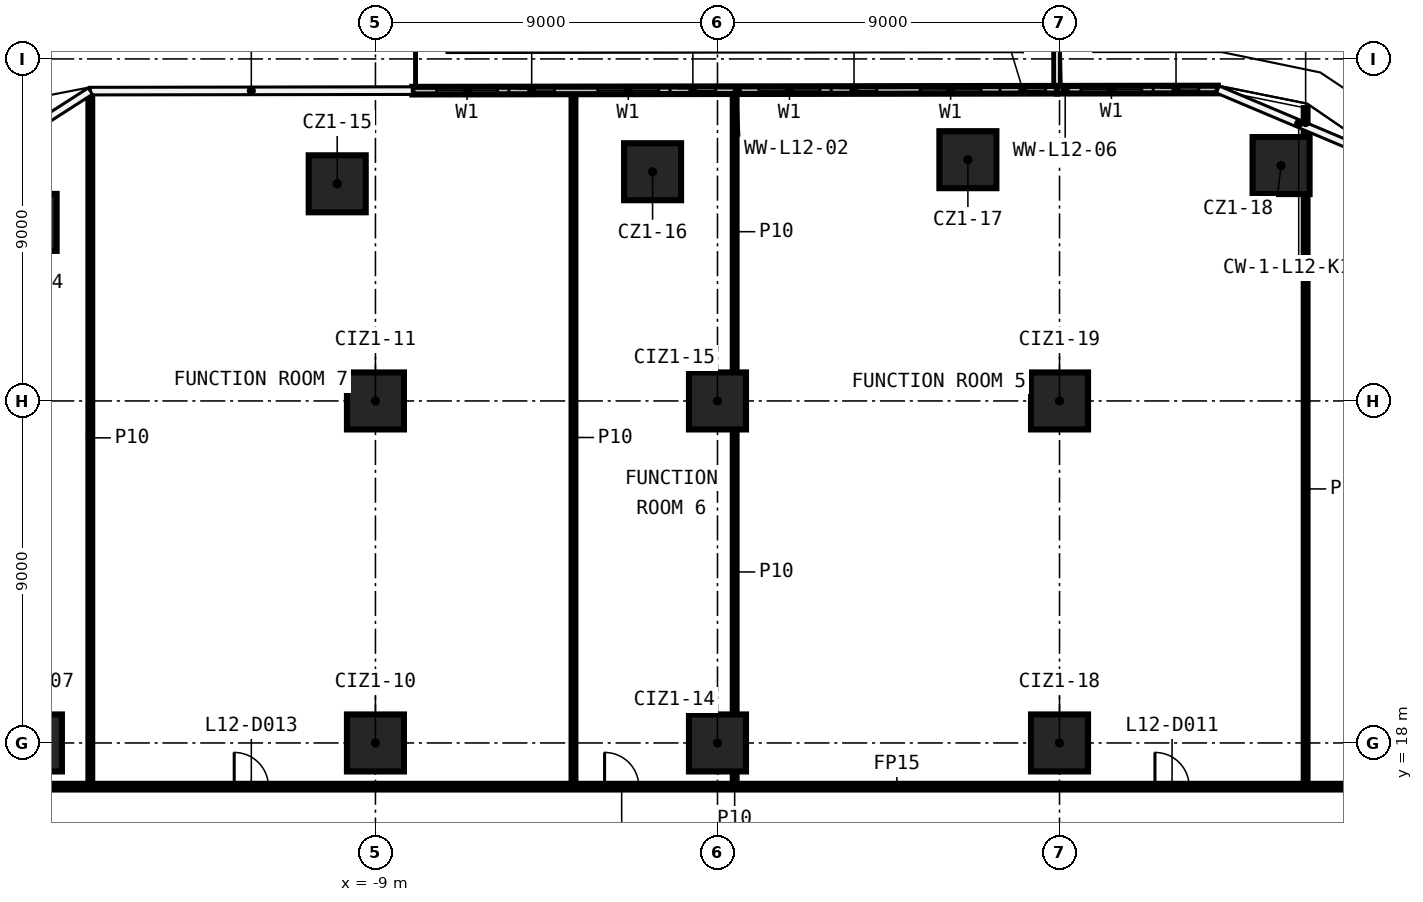
"""IFC4 building model, lengths in metres.
Left out: names, types, materials, properties, quantities, classifications, styles, units other than length and angle.
Written with IfcOpenShell. Run it as: python <this file> out.ifc"""

import sys

from ifc_helpers import new_model, si_unit, direction, frame, frame_2d, origin, origin_2d, place, context, subcontext, project, spatial, rectangle, extrude, element, fill, save


model = new_model("IFC4")
c1 = context("Model", 3, precision=1e-05, world=origin(), true_north=direction((0.0, 1.0)))
c2 = subcontext(c1, "Body", "Model", "MODEL_VIEW")
j1 = project(units=[si_unit("LENGTHUNIT", "METRE"), si_unit("PLANEANGLEUNIT", "RADIAN")], contexts=[c1])
p1 = place(None, origin())
s1 = spatial("IfcSite", under=j1, at=p1, CompositionType="ELEMENT")
p2 = place(p1, origin())
s2 = spatial("IfcBuilding", under=s1, at=p2, CompositionType="ELEMENT")
p3 = place(p2, frame((0.0, 0.0, 66.2)))
s3 = spatial("IfcBuildingStorey", under=s2, at=p3, CompositionType="ELEMENT", Elevation=66.2)
for number, where, z_axis, x_axis in (
    (1, (-18.139, 31.699, 0.0), (0.0, 0.0, 1.0), (1.0, 0.0, 0.0)),
    (2, (-10.006, 32.714, 0.0), (0.0, 0.0, 1.0), (1.0, 0.0, 0.0)),
    (3, (-1.708, 33.032, 0.0), (0.0, 0.0, 1.0), (1.0, 0.0, 0.0)),
    (4, (6.589, 33.349, 0.0), (0.0, 0.0, 1.0), (1.0, 0.0, 0.0)),
    (5, (14.83, 33.194, 0.0), (0.0, 0.0, 1.0), (1.0, 0.0, 0.0)),
    (6, (-18.0, 18.0, 0.0), (0.0, 0.0, 1.0), (1.0, 0.0, 0.0)),
    (7, (-9.0, 18.0, 0.0), (0.0, 0.0, 1.0), (1.0, 0.0, 0.0)),
    (8, (-9.0, 27.0, 0.0), (0.0, 0.0, 1.0), (1.0, 0.0, 0.0)),
    (9, (0.0, 18.0, 0.0), (0.0, 0.0, 1.0), (1.0, 0.0, 0.0)),
    (10, (0.0, 27.0, 0.0), (0.0, 0.0, 1.0), (1.0, 0.0, 0.0)),
    (11, (9.0, 18.0, 0.0), (0.0, 0.0, 1.0), (1.0, 0.0, 0.0)),
    (12, (9.0, 27.0, 0.0), (0.0, 0.0, 1.0), (1.0, 0.0, 0.0)),
):
    element("IfcColumn", number, at=place(p3, frame(where, z_axis=z_axis, x_axis=x_axis)), inside=s3, PredefinedType="COLUMN", context=c2, shape_type="SweptSolid", body=[
        extrude(rectangle(XDim=1.5, YDim=1.5, at=origin_2d()), origin(), (0.0, 0.0, 1.0), 3.3),
    ])
p4 = place(p3, frame((-19.925, 16.85, 0.0), z_axis=(0.0, 0.0, 1.0), x_axis=(1.0, 0.0, 0.0)))
e13 = element("IfcWall", 13, at=p4, inside=s3, PredefinedType="PARTITIONING", context=c2, shape_type="SweptSolid", body=[
    extrude(rectangle(XDim=39.85, YDim=0.15, at=frame_2d((19.925, 0.0))), origin(), (0.0, 0.0, 1.0), 3.3),
])
p5 = place(p4, frame((31.436, 0.0, 0.0)))
e14 = element("IfcOpeningElement", 14, at=p5, cuts=e13, PredefinedType="OPENING", context=c2, shape_type="SweptSolid", body=[
    extrude(rectangle(XDim=0.9, YDim=2.1, at=frame_2d((0.45, 1.05))), frame((0.0, 0.085, 0.0), z_axis=(0.0, -1.0, 0.0), x_axis=(1.0, 0.0, 0.0)), (0.0, 0.0, 1.0), 0.17),
])
p6 = place(p4, frame((16.954, 0.0, 0.0)))
e15 = element("IfcOpeningElement", 15, at=p6, cuts=e13, PredefinedType="OPENING", context=c2, shape_type="SweptSolid", body=[
    extrude(rectangle(XDim=0.9, YDim=2.1, at=frame_2d((0.45, 1.05))), frame((0.0, 0.085, 0.0), z_axis=(0.0, -1.0, 0.0), x_axis=(1.0, 0.0, 0.0)), (0.0, 0.0, 1.0), 0.17),
])
p7 = place(p4, frame((7.208, 0.0, 0.0)))
e16 = element("IfcOpeningElement", 16, at=p7, cuts=e13, PredefinedType="OPENING", context=c2, shape_type="SweptSolid", body=[
    extrude(rectangle(XDim=0.9, YDim=2.1, at=frame_2d((0.45, 1.05))), frame((0.0, 0.085, 0.0), z_axis=(0.0, -1.0, 0.0), x_axis=(1.0, 0.0, 0.0)), (0.0, 0.0, 1.0), 0.17),
])
p8 = place(p3, frame((15.476, 16.925, 0.0), z_axis=(0.0, 0.0, 1.0), x_axis=(0.0, 1.0, 0.0)))
e17 = element("IfcWall", 17, at=p8, inside=s3, PredefinedType="PARTITIONING", context=c2, shape_type="SweptSolid", body=[
    extrude(rectangle(XDim=15.519, YDim=0.1, at=frame_2d((7.76, 0.0))), origin(), (0.0, 0.0, 1.0), 3.3),
])
p9 = place(p3, frame((15.476, 33.944, 0.0), z_axis=(0.0, 0.0, 1.0), x_axis=(0.0, 1.0, 0.0)))
e18 = element("IfcWall", 18, at=p9, inside=s3, PredefinedType="PARTITIONING", context=c2, shape_type="SweptSolid", body=[
    extrude(rectangle(XDim=0.762, YDim=0.1, at=frame_2d((0.381, 0.0))), origin(), (0.0, 0.0, 1.0), 3.3),
])
p10 = place(p3, frame((0.452, 16.925, 0.0), z_axis=(0.0, 0.0, 1.0), x_axis=(0.0, 1.0, 0.0)))
e19 = element("IfcWall", 19, at=p10, inside=s3, PredefinedType="PARTITIONING", context=c2, shape_type="SweptSolid", body=[
    extrude(rectangle(XDim=0.325, YDim=0.1, at=frame_2d((0.163, 0.0))), origin(), (0.0, 0.0, 1.0), 3.3),
])
p11 = place(p3, frame((0.452, 18.75, 0.0), z_axis=(0.0, 0.0, 1.0), x_axis=(0.0, 1.0, 0.0)))
e20 = element("IfcWall", 20, at=p11, inside=s3, PredefinedType="PARTITIONING", context=c2, shape_type="SweptSolid", body=[
    extrude(rectangle(XDim=7.5, YDim=0.1, at=frame_2d((3.75, 0.0))), origin(), (0.0, 0.0, 1.0), 3.3),
])
p12 = place(p3, frame((0.452, 27.75, 0.0), z_axis=(0.0, 0.0, 1.0), x_axis=(0.0, 1.0, 0.0)))
e21 = element("IfcWall", 21, at=p12, inside=s3, PredefinedType="PARTITIONING", context=c2, shape_type="SweptSolid", body=[
    extrude(rectangle(XDim=7.407, YDim=0.1, at=frame_2d((3.704, 0.0))), origin(), (0.0, 0.0, 1.0), 3.3),
])
p13 = place(p3, frame((-3.789, 16.925, 0.0), z_axis=(0.0, 0.0, 1.0), x_axis=(0.0, 1.0, 0.0)))
e22 = element("IfcWall", 22, at=p13, inside=s3, PredefinedType="PARTITIONING", context=c2, shape_type="SweptSolid", body=[
    extrude(rectangle(XDim=18.226, YDim=0.1, at=frame_2d((9.113, 0.0))), origin(), (0.0, 0.0, 1.0), 3.3),
])
p14 = place(p3, frame((-16.503, 16.925, 0.0), z_axis=(0.0, 0.0, 1.0), x_axis=(0.0, 1.0, 0.0)))
e23 = element("IfcWall", 23, at=p14, inside=s3, PredefinedType="PARTITIONING", context=c2, shape_type="SweptSolid", body=[
    extrude(rectangle(XDim=18.208, YDim=0.1, at=frame_2d((9.104, 0.0))), origin(), (0.0, 0.0, 1.0), 3.3),
])
p15 = place(p3, frame((8.934, 35.19, 0.0), z_axis=(0.0, 0.0, 1.0), x_axis=(-0.999998964441, -0.001439137329, 0.0)))
e24 = element("IfcWall", 24, at=p15, inside=s3, PredefinedType="SOLIDWALL", context=c2, shape_type="SweptSolid", body=[
    extrude(rectangle(XDim=16.964, YDim=0.2, at=frame_2d((8.482, 0.0))), origin(), (0.0, 0.0, 1.0), 3.3),
])
p16 = place(p15, frame((2.0, 0.0, 0.6)))
e25 = element("IfcOpeningElement", 25, at=p16, cuts=e24, PredefinedType="OPENING", context=c2, shape_type="SweptSolid", body=[
    extrude(rectangle(XDim=1.6, YDim=2.4, at=frame_2d((0.8, 1.2))), frame((0.0, 0.11, 0.0), z_axis=(0.0, -1.0, 0.0), x_axis=(1.0, 0.0, 0.0)), (0.0, 0.0, 1.0), 0.22),
])
p17 = place(p15, frame((0.3, 0.0, 0.0)))
e26 = element("IfcOpeningElement", 26, at=p17, cuts=e24, PredefinedType="OPENING", context=c2, shape_type="SweptSolid", body=[
    extrude(rectangle(XDim=1.2, YDim=2.4, at=frame_2d((0.6, 1.2))), frame((0.0, 0.11, 0.0), z_axis=(0.0, -1.0, 0.0), x_axis=(1.0, 0.0, 0.0)), (0.0, 0.0, 1.0), 0.22),
])
p18 = place(p15, frame((6.241, 0.0, 0.6)))
e27 = element("IfcOpeningElement", 27, at=p18, cuts=e24, PredefinedType="OPENING", context=c2, shape_type="SweptSolid", body=[
    extrude(rectangle(XDim=1.6, YDim=2.4, at=frame_2d((0.8, 1.2))), frame((0.0, 0.11, 0.0), z_axis=(0.0, -1.0, 0.0), x_axis=(1.0, 0.0, 0.0)), (0.0, 0.0, 1.0), 0.22),
])
p19 = place(p15, frame((4.741, 0.0, 0.0)))
e28 = element("IfcOpeningElement", 28, at=p19, cuts=e24, PredefinedType="OPENING", context=c2, shape_type="SweptSolid", body=[
    extrude(rectangle(XDim=1.2, YDim=2.4, at=frame_2d((0.6, 1.2))), frame((0.0, 0.11, 0.0), z_axis=(0.0, -1.0, 0.0), x_axis=(1.0, 0.0, 0.0)), (0.0, 0.0, 1.0), 0.22),
])
p20 = place(p15, frame((10.482, 0.0, 0.6)))
e29 = element("IfcOpeningElement", 29, at=p20, cuts=e24, PredefinedType="OPENING", context=c2, shape_type="SweptSolid", body=[
    extrude(rectangle(XDim=1.6, YDim=2.4, at=frame_2d((0.8, 1.2))), frame((0.0, 0.11, 0.0), z_axis=(0.0, -1.0, 0.0), x_axis=(1.0, 0.0, 0.0)), (0.0, 0.0, 1.0), 0.22),
])
p21 = place(p15, frame((8.982, 0.0, 0.0)))
e30 = element("IfcOpeningElement", 30, at=p21, cuts=e24, PredefinedType="OPENING", context=c2, shape_type="SweptSolid", body=[
    extrude(rectangle(XDim=1.2, YDim=2.4, at=frame_2d((0.6, 1.2))), frame((0.0, 0.11, 0.0), z_axis=(0.0, -1.0, 0.0), x_axis=(1.0, 0.0, 0.0)), (0.0, 0.0, 1.0), 0.22),
])
p22 = place(p15, frame((14.723, 0.0, 0.6)))
e31 = element("IfcOpeningElement", 31, at=p22, cuts=e24, PredefinedType="OPENING", context=c2, shape_type="SweptSolid", body=[
    extrude(rectangle(XDim=1.6, YDim=2.4, at=frame_2d((0.8, 1.2))), frame((0.0, 0.11, 0.0), z_axis=(0.0, -1.0, 0.0), x_axis=(1.0, 0.0, 0.0)), (0.0, 0.0, 1.0), 0.22),
])
p23 = place(p15, frame((13.223, 0.0, 0.0)))
e32 = element("IfcOpeningElement", 32, at=p23, cuts=e24, PredefinedType="OPENING", context=c2, shape_type="SweptSolid", body=[
    extrude(rectangle(XDim=1.2, YDim=2.4, at=frame_2d((0.6, 1.2))), frame((0.0, 0.11, 0.0), z_axis=(0.0, -1.0, 0.0), x_axis=(1.0, 0.0, 0.0)), (0.0, 0.0, 1.0), 0.22),
])
p24 = place(p3, frame((13.166, 35.196, 0.0), z_axis=(0.0, 0.0, 1.0), x_axis=(-0.999998959596, -0.001442500374, 0.0)))
e33 = element("IfcWall", 33, at=p24, inside=s3, PredefinedType="SOLIDWALL", context=c2, shape_type="SweptSolid", body=[
    extrude(rectangle(XDim=4.231, YDim=0.2, at=frame_2d((2.116, 0.0))), origin(), (0.0, 0.0, 1.0), 3.3),
])
p25 = place(p24, frame((2.0, 0.0, 0.6)))
e34 = element("IfcOpeningElement", 34, at=p25, cuts=e33, PredefinedType="OPENING", context=c2, shape_type="SweptSolid", body=[
    extrude(rectangle(XDim=1.6, YDim=2.4, at=frame_2d((0.8, 1.2))), frame((0.0, 0.11, 0.0), z_axis=(0.0, -1.0, 0.0), x_axis=(1.0, 0.0, 0.0)), (0.0, 0.0, 1.0), 0.22),
])
p26 = place(p24, frame((0.5, 0.0, 0.0)))
e35 = element("IfcOpeningElement", 35, at=p26, cuts=e33, PredefinedType="OPENING", context=c2, shape_type="SweptSolid", body=[
    extrude(rectangle(XDim=1.2, YDim=2.4, at=frame_2d((0.6, 1.2))), frame((0.0, 0.11, 0.0), z_axis=(0.0, -1.0, 0.0), x_axis=(1.0, 0.0, 0.0)), (0.0, 0.0, 1.0), 0.22),
])
p27 = place(p5, origin())
e36 = element("IfcDoor", 36, at=p27, inside=s3, OperationType="SINGLE_SWING_RIGHT", PredefinedType="DOOR", context=c2, shape_type="SweptSolid", body=[
    extrude(rectangle(XDim=0.9, YDim=2.1, at=frame_2d((0.45, 1.05))), frame((0.0, 0.025, 0.0), z_axis=(0.0, -1.0, 0.0), x_axis=(1.0, 0.0, 0.0)), (0.0, 0.0, 1.0), 0.05),
])
fill(e14, e36)
p28 = place(p6, origin())
e37 = element("IfcDoor", 37, at=p28, inside=s3, OperationType="SINGLE_SWING_LEFT", PredefinedType="DOOR", context=c2, shape_type="SweptSolid", body=[
    extrude(rectangle(XDim=0.9, YDim=2.1, at=frame_2d((0.45, 1.05))), frame((0.0, 0.025, 0.0), z_axis=(0.0, -1.0, 0.0), x_axis=(1.0, 0.0, 0.0)), (0.0, 0.0, 1.0), 0.05),
])
fill(e15, e37)
p29 = place(p7, origin())
e38 = element("IfcDoor", 38, at=p29, inside=s3, OperationType="SINGLE_SWING_RIGHT", PredefinedType="DOOR", context=c2, shape_type="SweptSolid", body=[
    extrude(rectangle(XDim=0.9, YDim=2.1, at=frame_2d((0.45, 1.05))), frame((0.0, 0.025, 0.0), z_axis=(0.0, -1.0, 0.0), x_axis=(1.0, 0.0, 0.0)), (0.0, 0.0, 1.0), 0.05),
])
fill(e16, e38)
p30 = place(p16, origin())
e39 = element("IfcWindow", 39, at=p30, inside=s3, PartitioningType="SINGLE_PANEL", PredefinedType="WINDOW", context=c2, shape_type="SweptSolid", body=[
    extrude(rectangle(XDim=1.6, YDim=2.4, at=frame_2d((0.8, 1.2))), frame((0.0, 0.03, 0.0), z_axis=(0.0, -1.0, 0.0), x_axis=(1.0, 0.0, 0.0)), (0.0, 0.0, 1.0), 0.06),
])
fill(e25, e39)
p31 = place(p17, origin())
e40 = element("IfcDoor", 40, at=p31, inside=s3, OperationType="SLIDING_TO_LEFT", PredefinedType="DOOR", context=c2, shape_type="SweptSolid", body=[
    extrude(rectangle(XDim=1.2, YDim=2.4, at=frame_2d((0.6, 1.2))), frame((0.0, 0.025, 0.0), z_axis=(0.0, -1.0, 0.0), x_axis=(1.0, 0.0, 0.0)), (0.0, 0.0, 1.0), 0.05),
])
fill(e26, e40)
p32 = place(p18, origin())
e41 = element("IfcWindow", 41, at=p32, inside=s3, PartitioningType="SINGLE_PANEL", PredefinedType="WINDOW", context=c2, shape_type="SweptSolid", body=[
    extrude(rectangle(XDim=1.6, YDim=2.4, at=frame_2d((0.8, 1.2))), frame((0.0, 0.03, 0.0), z_axis=(0.0, -1.0, 0.0), x_axis=(1.0, 0.0, 0.0)), (0.0, 0.0, 1.0), 0.06),
])
fill(e27, e41)
p33 = place(p19, origin())
e42 = element("IfcDoor", 42, at=p33, inside=s3, OperationType="SLIDING_TO_LEFT", PredefinedType="DOOR", context=c2, shape_type="SweptSolid", body=[
    extrude(rectangle(XDim=1.2, YDim=2.4, at=frame_2d((0.6, 1.2))), frame((0.0, 0.025, 0.0), z_axis=(0.0, -1.0, 0.0), x_axis=(1.0, 0.0, 0.0)), (0.0, 0.0, 1.0), 0.05),
])
fill(e28, e42)
p34 = place(p20, origin())
e43 = element("IfcWindow", 43, at=p34, inside=s3, PartitioningType="SINGLE_PANEL", PredefinedType="WINDOW", context=c2, shape_type="SweptSolid", body=[
    extrude(rectangle(XDim=1.6, YDim=2.4, at=frame_2d((0.8, 1.2))), frame((0.0, 0.03, 0.0), z_axis=(0.0, -1.0, 0.0), x_axis=(1.0, 0.0, 0.0)), (0.0, 0.0, 1.0), 0.06),
])
fill(e29, e43)
p35 = place(p21, origin())
e44 = element("IfcDoor", 44, at=p35, inside=s3, OperationType="SLIDING_TO_LEFT", PredefinedType="DOOR", context=c2, shape_type="SweptSolid", body=[
    extrude(rectangle(XDim=1.2, YDim=2.4, at=frame_2d((0.6, 1.2))), frame((0.0, 0.025, 0.0), z_axis=(0.0, -1.0, 0.0), x_axis=(1.0, 0.0, 0.0)), (0.0, 0.0, 1.0), 0.05),
])
fill(e30, e44)
p36 = place(p22, origin())
e45 = element("IfcWindow", 45, at=p36, inside=s3, PartitioningType="SINGLE_PANEL", PredefinedType="WINDOW", context=c2, shape_type="SweptSolid", body=[
    extrude(rectangle(XDim=1.6, YDim=2.4, at=frame_2d((0.8, 1.2))), frame((0.0, 0.03, 0.0), z_axis=(0.0, -1.0, 0.0), x_axis=(1.0, 0.0, 0.0)), (0.0, 0.0, 1.0), 0.06),
])
fill(e31, e45)
p37 = place(p23, origin())
e46 = element("IfcDoor", 46, at=p37, inside=s3, OperationType="SLIDING_TO_LEFT", PredefinedType="DOOR", context=c2, shape_type="SweptSolid", body=[
    extrude(rectangle(XDim=1.2, YDim=2.4, at=frame_2d((0.6, 1.2))), frame((0.0, 0.025, 0.0), z_axis=(0.0, -1.0, 0.0), x_axis=(1.0, 0.0, 0.0)), (0.0, 0.0, 1.0), 0.05),
])
fill(e32, e46)
p38 = place(p25, origin())
e47 = element("IfcWindow", 47, at=p38, inside=s3, PartitioningType="SINGLE_PANEL", PredefinedType="WINDOW", context=c2, shape_type="SweptSolid", body=[
    extrude(rectangle(XDim=1.6, YDim=2.4, at=frame_2d((0.8, 1.2))), frame((0.0, 0.03, 0.0), z_axis=(0.0, -1.0, 0.0), x_axis=(1.0, 0.0, 0.0)), (0.0, 0.0, 1.0), 0.06),
])
fill(e34, e47)
p39 = place(p26, origin())
e48 = element("IfcDoor", 48, at=p39, inside=s3, OperationType="SLIDING_TO_LEFT", PredefinedType="DOOR", context=c2, shape_type="SweptSolid", body=[
    extrude(rectangle(XDim=1.2, YDim=2.4, at=frame_2d((0.6, 1.2))), frame((0.0, 0.025, 0.0), z_axis=(0.0, -1.0, 0.0), x_axis=(1.0, 0.0, 0.0)), (0.0, 0.0, 1.0), 0.05),
])
fill(e35, e48)
save(model, sys.argv[1])
